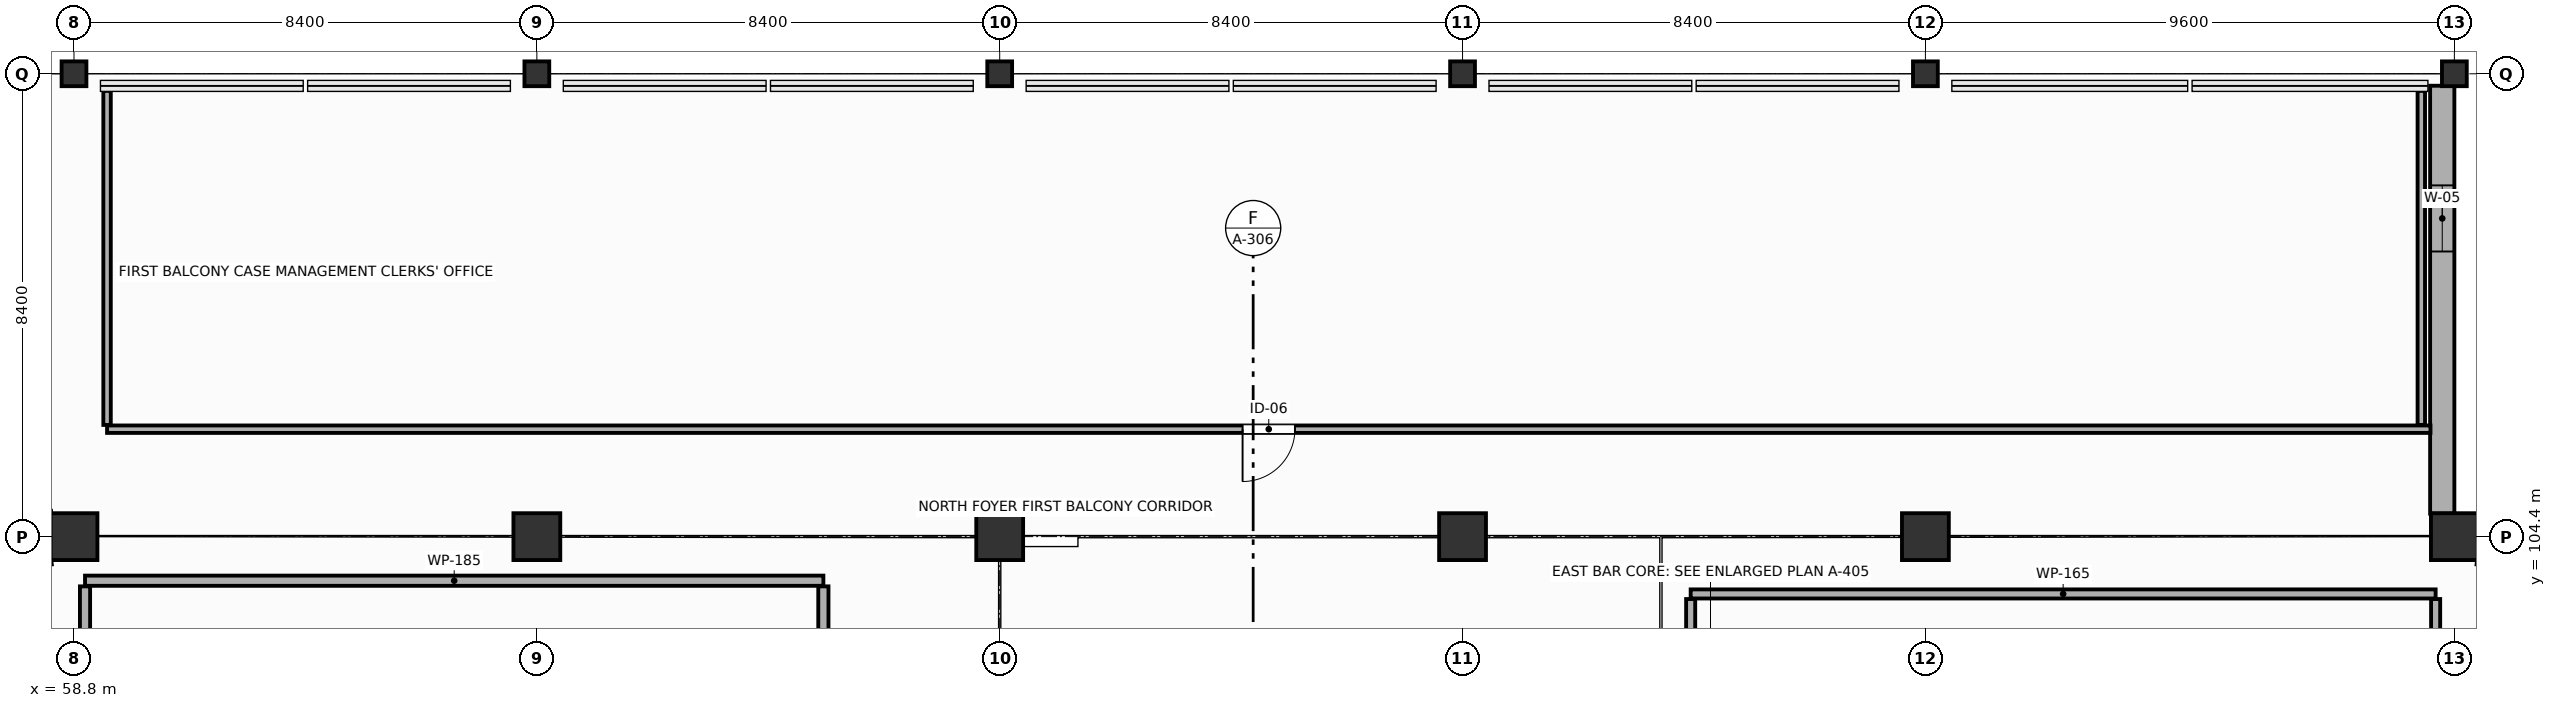
"""IFC4 building model, lengths in metres.
Left out: names, types, materials, properties, quantities, classifications, styles, units other than length and angle.
Written with IfcOpenShell. Run it as: python <this file> out.ifc"""

import sys

from ifc_helpers import new_model, si_unit, direction, frame, frame_2d, origin, origin_2d, place, context, subcontext, project, spatial, rectangle, extrude, element, fill, save


model = new_model("IFC4")
c1 = context("Model", 3, precision=1e-05, world=origin(), true_north=direction((0.0, 1.0)))
c2 = subcontext(c1, "Body", "Model", "MODEL_VIEW")
j1 = project(units=[si_unit("LENGTHUNIT", "METRE"), si_unit("PLANEANGLEUNIT", "RADIAN")], contexts=[c1])
p1 = place(None, origin())
s1 = spatial("IfcSite", under=j1, at=p1, CompositionType="ELEMENT")
p2 = place(p1, origin())
s2 = spatial("IfcBuilding", under=s1, at=p2, CompositionType="ELEMENT")
p3 = place(p2, frame((0.0, 0.0, 5.4)))
s3 = spatial("IfcBuildingStorey", under=s2, at=p3, CompositionType="ELEMENT", Elevation=5.4)
p4 = place(p3, frame((58.8, 104.4, 0.0), z_axis=(0.0, 0.0, 1.0), x_axis=(1.0, 0.0, 0.0)))
e1 = element("IfcColumn", 1, at=p4, inside=s3, PredefinedType="COLUMN", context=c2, shape_type="SweptSolid", body=[
    extrude(rectangle(XDim=0.85, YDim=0.85, at=origin_2d()), origin(), (0.0, 0.0, 1.0), 4.5),
])
p5 = place(p3, frame((58.8, 112.8, 0.0), z_axis=(0.0, 0.0, 1.0), x_axis=(1.0, 0.0, 0.0)))
e2 = element("IfcColumn", 2, at=p5, inside=s3, PredefinedType="COLUMN", context=c2, shape_type="SweptSolid", body=[
    extrude(rectangle(XDim=0.45, YDim=0.45, at=origin_2d()), origin(), (0.0, 0.0, 1.0), 4.5),
])
p6 = place(p3, frame((67.2, 104.4, 0.0), z_axis=(0.0, 0.0, 1.0), x_axis=(1.0, 0.0, 0.0)))
e3 = element("IfcColumn", 3, at=p6, inside=s3, PredefinedType="COLUMN", context=c2, shape_type="SweptSolid", body=[
    extrude(rectangle(XDim=0.85, YDim=0.85, at=origin_2d()), origin(), (0.0, 0.0, 1.0), 4.5),
])
p7 = place(p3, frame((67.2, 112.8, 0.0), z_axis=(0.0, 0.0, 1.0), x_axis=(1.0, 0.0, 0.0)))
e4 = element("IfcColumn", 4, at=p7, inside=s3, PredefinedType="COLUMN", context=c2, shape_type="SweptSolid", body=[
    extrude(rectangle(XDim=0.45, YDim=0.45, at=origin_2d()), origin(), (0.0, 0.0, 1.0), 4.5),
])
p8 = place(p3, frame((75.6, 104.4, 0.0), z_axis=(0.0, 0.0, 1.0), x_axis=(1.0, 0.0, 0.0)))
e5 = element("IfcColumn", 5, at=p8, inside=s3, PredefinedType="COLUMN", context=c2, shape_type="SweptSolid", body=[
    extrude(rectangle(XDim=0.85, YDim=0.85, at=origin_2d()), origin(), (0.0, 0.0, 1.0), 4.5),
])
p9 = place(p3, frame((75.6, 112.8, 0.0), z_axis=(0.0, 0.0, 1.0), x_axis=(1.0, 0.0, 0.0)))
e6 = element("IfcColumn", 6, at=p9, inside=s3, PredefinedType="COLUMN", context=c2, shape_type="SweptSolid", body=[
    extrude(rectangle(XDim=0.45, YDim=0.45, at=origin_2d()), origin(), (0.0, 0.0, 1.0), 4.5),
])
p10 = place(p3, frame((84.0, 104.4, 0.0), z_axis=(0.0, 0.0, 1.0), x_axis=(1.0, 0.0, 0.0)))
e7 = element("IfcColumn", 7, at=p10, inside=s3, PredefinedType="COLUMN", context=c2, shape_type="SweptSolid", body=[
    extrude(rectangle(XDim=0.85, YDim=0.85, at=origin_2d()), origin(), (0.0, 0.0, 1.0), 4.5),
])
p11 = place(p3, frame((84.0, 112.8, 0.0), z_axis=(0.0, 0.0, 1.0), x_axis=(1.0, 0.0, 0.0)))
e8 = element("IfcColumn", 8, at=p11, inside=s3, PredefinedType="COLUMN", context=c2, shape_type="SweptSolid", body=[
    extrude(rectangle(XDim=0.45, YDim=0.45, at=origin_2d()), origin(), (0.0, 0.0, 1.0), 4.5),
])
p12 = place(p3, frame((92.4, 104.4, 0.0), z_axis=(0.0, 0.0, 1.0), x_axis=(1.0, 0.0, 0.0)))
e9 = element("IfcColumn", 9, at=p12, inside=s3, PredefinedType="COLUMN", context=c2, shape_type="SweptSolid", body=[
    extrude(rectangle(XDim=0.85, YDim=0.85, at=origin_2d()), origin(), (0.0, 0.0, 1.0), 4.5),
])
p13 = place(p3, frame((92.4, 112.8, 0.0), z_axis=(0.0, 0.0, 1.0), x_axis=(1.0, 0.0, 0.0)))
e10 = element("IfcColumn", 10, at=p13, inside=s3, PredefinedType="COLUMN", context=c2, shape_type="SweptSolid", body=[
    extrude(rectangle(XDim=0.45, YDim=0.45, at=origin_2d()), origin(), (0.0, 0.0, 1.0), 4.5),
])
p14 = place(p3, frame((102.0, 104.4, 0.0), z_axis=(0.0, 0.0, 1.0), x_axis=(1.0, 0.0, 0.0)))
e11 = element("IfcColumn", 11, at=p14, inside=s3, PredefinedType="COLUMN", context=c2, shape_type="SweptSolid", body=[
    extrude(rectangle(XDim=0.85, YDim=0.85, at=origin_2d()), origin(), (0.0, 0.0, 1.0), 4.5),
])
p15 = place(p3, frame((102.0, 112.8, 0.0), z_axis=(0.0, 0.0, 1.0), x_axis=(1.0, 0.0, 0.0)))
e12 = element("IfcColumn", 12, at=p15, inside=s3, PredefinedType="COLUMN", context=c2, shape_type="SweptSolid", body=[
    extrude(rectangle(XDim=0.45, YDim=0.45, at=origin_2d()), origin(), (0.0, 0.0, 1.0), 4.5),
])
p16 = place(p3, frame((101.78, 112.583, 0.0), z_axis=(0.0, 0.0, 1.0), x_axis=(0.0, -1.0, 0.0)))
e13 = element("IfcWall", 13, at=p16, inside=s3, PredefinedType="STANDARD", context=c2, shape_type="SweptSolid", body=[
    extrude(rectangle(XDim=7.766, YDim=0.44, at=frame_2d((3.883, 0.0))), origin(), (0.0, 0.0, 1.0), 3.37),
])
p17 = place(p16, frame((1.808, 0.0, 0.9)))
e14 = element("IfcOpeningElement", 14, at=p17, cuts=e13, PredefinedType="OPENING", context=c2, shape_type="SweptSolid", body=[
    extrude(rectangle(XDim=1.2, YDim=1.85, at=frame_2d((0.6, 0.925))), frame((0.0, 0.23, 0.0), z_axis=(0.0, -1.0, 0.0), x_axis=(1.0, 0.0, 0.0)), (0.0, 0.0, 1.0), 0.46),
])
p18 = place(p3, frame((101.566, 106.35, 0.0), z_axis=(0.0, 0.0, 1.0), x_axis=(-1.0, 0.0, 0.0)))
e15 = element("IfcWall", 15, at=p18, inside=s3, PredefinedType="PARTITIONING", context=c2, shape_type="SweptSolid", body=[
    extrude(rectangle(XDim=42.166, YDim=0.135, at=frame_2d((21.083, 0.0))), origin(), (0.0, 0.0, 1.0), 3.72),
])
p19 = place(p18, frame((20.608, 0.0, 0.0)))
e16 = element("IfcOpeningElement", 16, at=p19, cuts=e15, PredefinedType="OPENING", context=c2, shape_type="SweptSolid", body=[
    extrude(rectangle(XDim=0.95, YDim=2.15, at=frame_2d((0.475, 1.075))), frame((0.0, 0.077, 0.0), z_axis=(0.0, -1.0, 0.0), x_axis=(1.0, 0.0, 0.0)), (0.0, 0.0, 1.0), 0.155),
])
p20 = place(p3, frame((59.4, 106.427, 0.0), z_axis=(0.0, 0.0, 1.0), x_axis=(0.0, 1.0, 0.0)))
e17 = element("IfcWall", 17, at=p20, inside=s3, PredefinedType="PARTITIONING", context=c2, shape_type="SweptSolid", body=[
    extrude(rectangle(XDim=6.062, YDim=0.135, at=frame_2d((3.031, 0.0))), origin(), (0.0, 0.0, 1.0), 3.77),
])
p21 = place(p3, frame((101.4, 112.49, 0.0), z_axis=(0.0, 0.0, 1.0), x_axis=(0.0, -1.0, 0.0)))
e18 = element("IfcWall", 18, at=p21, inside=s3, PredefinedType="PARTITIONING", context=c2, shape_type="SweptSolid", body=[
    extrude(rectangle(XDim=6.062, YDim=0.135, at=frame_2d((3.031, 0.0))), origin(), (0.0, 0.0, 1.0), 3.67),
])
p22 = place(p3, frame((59.0, 103.6, 0.0), z_axis=(0.0, 0.0, 1.0), x_axis=(1.0, 0.0, 0.0)))
e19 = element("IfcWall", 19, at=p22, inside=s3, PredefinedType="PARTITIONING", context=c2, shape_type="SweptSolid", body=[
    extrude(rectangle(XDim=13.4, YDim=0.185, at=frame_2d((6.7, 0.0))), origin(), (0.0, 0.0, 1.0), 3.37),
])
p23 = place(p3, frame((59.0, 95.702, 0.0), z_axis=(0.0, 0.0, 1.0), x_axis=(0.0, 1.0, 0.0)))
e20 = element("IfcWall", 20, at=p23, inside=s3, PredefinedType="PARTITIONING", context=c2, shape_type="SweptSolid", body=[
    extrude(rectangle(XDim=7.795, YDim=0.185, at=frame_2d((3.897, 0.0))), origin(), (0.0, 0.0, 1.0), 3.37),
])
p24 = place(p3, frame((72.4, 103.498, 0.0), z_axis=(0.0, 0.0, 1.0), x_axis=(0.0, -1.0, 0.0)))
e21 = element("IfcWall", 21, at=p24, inside=s3, PredefinedType="PARTITIONING", context=c2, shape_type="SweptSolid", body=[
    extrude(rectangle(XDim=7.795, YDim=0.185, at=frame_2d((3.897, 0.0))), origin(), (0.0, 0.0, 1.0), 3.62),
])
p25 = place(p24, frame((2.133, 0.0, 0.0)))
e22 = element("IfcOpeningElement", 22, at=p25, cuts=e21, PredefinedType="OPENING", context=c2, shape_type="SweptSolid", body=[
    extrude(rectangle(XDim=2.0, YDim=2.5, at=frame_2d((1.0, 1.25))), frame((0.0, 0.103, 0.0), z_axis=(0.0, -1.0, 0.0), x_axis=(1.0, 0.0, 0.0)), (0.0, 0.0, 1.0), 0.205),
])
p26 = place(p3, frame((88.14, 103.36, 0.0), z_axis=(0.0, 0.0, 1.0), x_axis=(1.0, 0.0, 0.0)))
e23 = element("IfcWall", 23, at=p26, inside=s3, PredefinedType="PARTITIONING", context=c2, shape_type="SweptSolid", body=[
    extrude(rectangle(XDim=13.52, YDim=0.165, at=frame_2d((6.76, 0.0))), origin(), (0.0, 0.0, 1.0), 3.37),
])
p27 = place(p3, frame((88.14, 92.183, 0.0), z_axis=(0.0, 0.0, 1.0), x_axis=(0.0, 1.0, 0.0)))
e24 = element("IfcWall", 24, at=p27, inside=s3, PredefinedType="PARTITIONING", context=c2, shape_type="SweptSolid", body=[
    extrude(rectangle(XDim=11.085, YDim=0.165, at=frame_2d((5.542, 0.0))), origin(), (0.0, 0.0, 1.0), 3.57),
])
p28 = place(p3, frame((101.66, 103.268, 0.0), z_axis=(0.0, 0.0, 1.0), x_axis=(0.0, -1.0, 0.0)))
e25 = element("IfcWall", 25, at=p28, inside=s3, PredefinedType="PARTITIONING", context=c2, shape_type="SweptSolid", body=[
    extrude(rectangle(XDim=11.085, YDim=0.165, at=frame_2d((5.542, 0.0))), origin(), (0.0, 0.0, 1.0), 3.37),
])
p29 = place(p17, origin())
e26 = element("IfcWindow", 26, at=p29, inside=s3, PartitioningType="SINGLE_PANEL", PredefinedType="WINDOW", context=c2, shape_type="SweptSolid", body=[
    extrude(rectangle(XDim=1.2, YDim=1.85, at=frame_2d((0.6, 0.925))), frame((0.0, 0.03, 0.0), z_axis=(0.0, -1.0, 0.0), x_axis=(1.0, 0.0, 0.0)), (0.0, 0.0, 1.0), 0.06),
])
fill(e14, e26)
p30 = place(p19, origin())
e27 = element("IfcDoor", 27, at=p30, inside=s3, OperationType="SINGLE_SWING_RIGHT", PredefinedType="DOOR", context=c2, shape_type="SweptSolid", body=[
    extrude(rectangle(XDim=0.95, YDim=2.15, at=frame_2d((0.475, 1.075))), frame((0.0, 0.025, 0.0), z_axis=(0.0, -1.0, 0.0), x_axis=(1.0, 0.0, 0.0)), (0.0, 0.0, 1.0), 0.05),
])
fill(e16, e27)
save(model, sys.argv[1])
